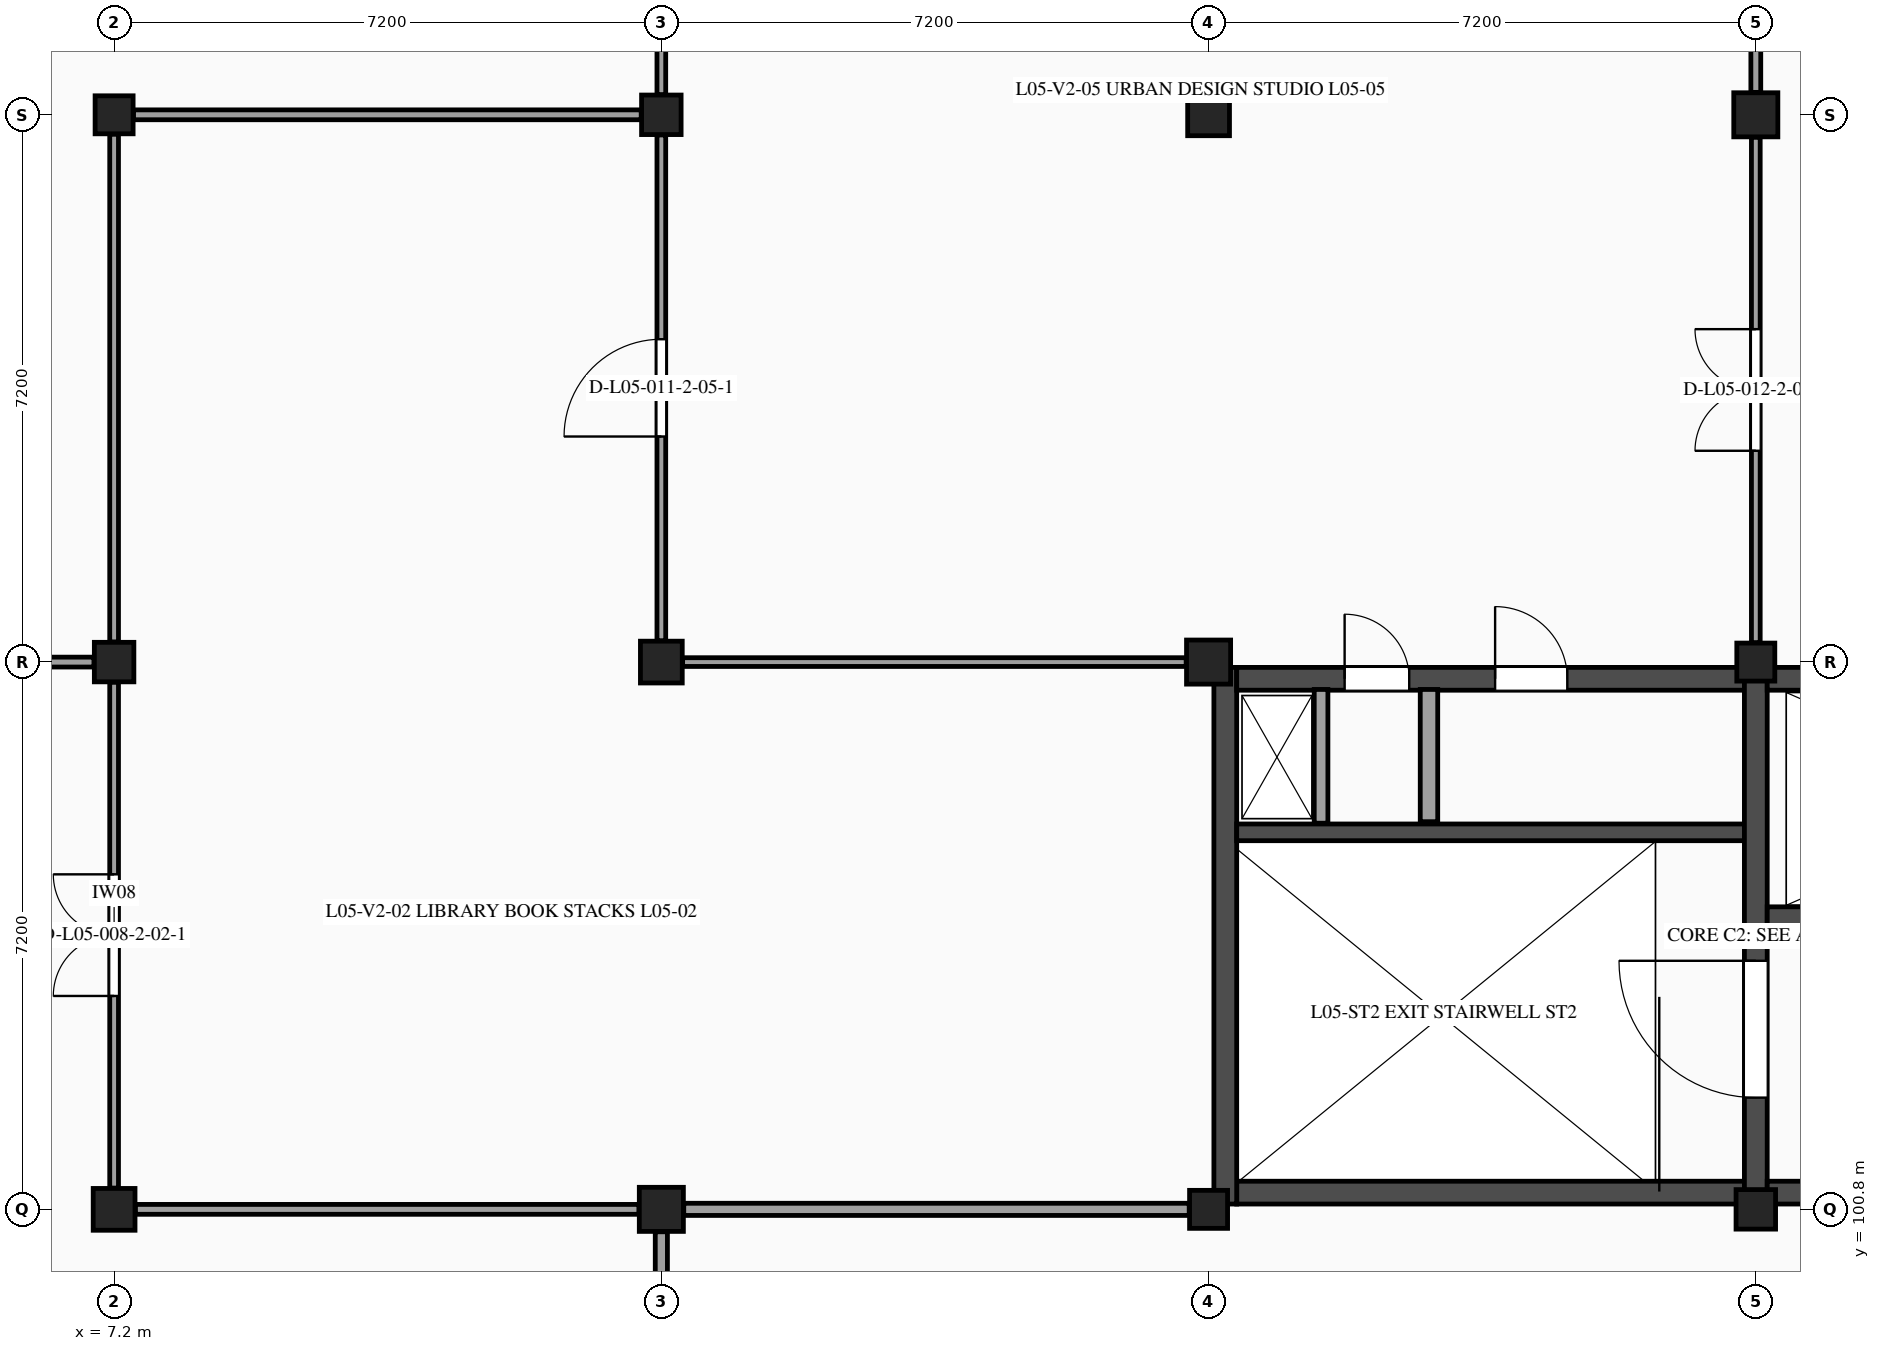
"""IFC4 building model, lengths in metres.
Left out: names, types, materials, properties, quantities, classifications, styles, units other than length and angle.
Written with IfcOpenShell. Run it as: python <this file> out.ifc"""

import sys

from ifc_helpers import new_model, si_unit, direction, frame, frame_2d, origin, origin_2d, place, context, subcontext, project, spatial, rectangle, extrude, element, fill, save


model = new_model("IFC4")
c1 = context("Model", 3, precision=1e-05, world=origin(), true_north=direction((0.0, 1.0)))
c2 = subcontext(c1, "Body", "Model", "MODEL_VIEW")
j1 = project(units=[si_unit("LENGTHUNIT", "METRE"), si_unit("PLANEANGLEUNIT", "RADIAN")], contexts=[c1])
p1 = place(None, origin())
s1 = spatial("IfcSite", under=j1, at=p1, CompositionType="ELEMENT")
p2 = place(p1, origin())
s2 = spatial("IfcBuilding", under=s1, at=p2, CompositionType="ELEMENT")
p3 = place(p2, frame((0.0, 0.0, 22.8)))
s3 = spatial("IfcBuildingStorey", under=s2, at=p3, CompositionType="ELEMENT", Elevation=22.8)
p4 = place(p3, frame((7.2, 100.8, 0.0), z_axis=(0.0, 0.0, 1.0), x_axis=(1.0, 0.0, 0.0)))
e1 = element("IfcColumn", 1, at=p4, inside=s3, PredefinedType="COLUMN", context=c2, shape_type="SweptSolid", body=[
    extrude(rectangle(XDim=0.55, YDim=0.55, at=origin_2d()), origin(), (0.0, 0.0, 1.0), 3.9),
])
p5 = place(p3, frame((7.2, 108.0, 0.0), z_axis=(0.0, 0.0, 1.0), x_axis=(1.0, 0.0, 0.0)))
e2 = element("IfcColumn", 2, at=p5, inside=s3, PredefinedType="COLUMN", context=c2, shape_type="SweptSolid", body=[
    extrude(rectangle(XDim=0.52, YDim=0.52, at=origin_2d()), origin(), (0.0, 0.0, 1.0), 3.9),
])
p6 = place(p3, frame((7.2, 115.2, 0.0), z_axis=(0.0, 0.0, 1.0), x_axis=(1.0, 0.0, 0.0)))
e3 = element("IfcColumn", 3, at=p6, inside=s3, PredefinedType="COLUMN", context=c2, shape_type="SweptSolid", body=[
    extrude(rectangle(XDim=0.5, YDim=0.5, at=origin_2d()), origin(), (0.0, 0.0, 1.0), 3.9),
])
p7 = place(p3, frame((14.4, 100.8, 0.0), z_axis=(0.0, 0.0, 1.0), x_axis=(1.0, 0.0, 0.0)))
e4 = element("IfcColumn", 4, at=p7, inside=s3, PredefinedType="COLUMN", context=c2, shape_type="SweptSolid", body=[
    extrude(rectangle(XDim=0.58, YDim=0.58, at=origin_2d()), origin(), (0.0, 0.0, 1.0), 3.9),
])
p8 = place(p3, frame((14.4, 108.0, 0.0), z_axis=(0.0, 0.0, 1.0), x_axis=(1.0, 0.0, 0.0)))
e5 = element("IfcColumn", 5, at=p8, inside=s3, PredefinedType="COLUMN", context=c2, shape_type="SweptSolid", body=[
    extrude(rectangle(XDim=0.55, YDim=0.55, at=origin_2d()), origin(), (0.0, 0.0, 1.0), 3.9),
])
p9 = place(p3, frame((14.4, 115.2, 0.0), z_axis=(0.0, 0.0, 1.0), x_axis=(1.0, 0.0, 0.0)))
e6 = element("IfcColumn", 6, at=p9, inside=s3, PredefinedType="COLUMN", context=c2, shape_type="SweptSolid", body=[
    extrude(rectangle(XDim=0.52, YDim=0.52, at=origin_2d()), origin(), (0.0, 0.0, 1.0), 3.9),
])
p10 = place(p3, frame((21.6, 100.8, 0.0), z_axis=(0.0, 0.0, 1.0), x_axis=(1.0, 0.0, 0.0)))
e7 = element("IfcColumn", 7, at=p10, inside=s3, PredefinedType="COLUMN", context=c2, shape_type="SweptSolid", body=[
    extrude(rectangle(XDim=0.5, YDim=0.5, at=origin_2d()), origin(), (0.0, 0.0, 1.0), 3.9),
])
p11 = place(p3, frame((21.6, 108.0, 0.0), z_axis=(0.0, 0.0, 1.0), x_axis=(1.0, 0.0, 0.0)))
e8 = element("IfcColumn", 8, at=p11, inside=s3, PredefinedType="COLUMN", context=c2, shape_type="SweptSolid", body=[
    extrude(rectangle(XDim=0.58, YDim=0.58, at=origin_2d()), origin(), (0.0, 0.0, 1.0), 3.9),
])
p12 = place(p3, frame((21.6, 115.2, 0.0), z_axis=(0.0, 0.0, 1.0), x_axis=(1.0, 0.0, 0.0)))
e9 = element("IfcColumn", 9, at=p12, inside=s3, PredefinedType="COLUMN", context=c2, shape_type="SweptSolid", body=[
    extrude(rectangle(XDim=0.55, YDim=0.55, at=origin_2d()), origin(), (0.0, 0.0, 1.0), 3.9),
])
p13 = place(p3, frame((28.8, 100.8, 0.0), z_axis=(0.0, 0.0, 1.0), x_axis=(1.0, 0.0, 0.0)))
e10 = element("IfcColumn", 10, at=p13, inside=s3, PredefinedType="COLUMN", context=c2, shape_type="SweptSolid", body=[
    extrude(rectangle(XDim=0.52, YDim=0.52, at=origin_2d()), origin(), (0.0, 0.0, 1.0), 3.9),
])
p14 = place(p3, frame((28.8, 108.0, 0.0), z_axis=(0.0, 0.0, 1.0), x_axis=(1.0, 0.0, 0.0)))
e11 = element("IfcColumn", 11, at=p14, inside=s3, PredefinedType="COLUMN", context=c2, shape_type="SweptSolid", body=[
    extrude(rectangle(XDim=0.5, YDim=0.5, at=origin_2d()), origin(), (0.0, 0.0, 1.0), 3.9),
])
p15 = place(p3, frame((28.8, 115.2, 0.0), z_axis=(0.0, 0.0, 1.0), x_axis=(1.0, 0.0, 0.0)))
e12 = element("IfcColumn", 12, at=p15, inside=s3, PredefinedType="COLUMN", context=c2, shape_type="SweptSolid", body=[
    extrude(rectangle(XDim=0.58, YDim=0.58, at=origin_2d()), origin(), (0.0, 0.0, 1.0), 3.9),
])
p16 = place(p3, frame((21.97, 101.02, 0.0), z_axis=(0.0, 0.0, 1.0), x_axis=(1.0, 0.0, 0.0)))
e13 = element("IfcWall", 13, at=p16, inside=s3, PredefinedType="SHEAR", context=c2, shape_type="SweptSolid", body=[
    extrude(rectangle(XDim=6.68, YDim=0.3, at=frame_2d((3.34, 0.0))), origin(), (0.0, 0.0, 1.0), 3.67),
])
p17 = place(p3, frame((21.82, 107.93, 0.0), z_axis=(0.0, 0.0, 1.0), x_axis=(0.0, -1.0, 0.0)))
e14 = element("IfcWall", 14, at=p17, inside=s3, PredefinedType="SHEAR", context=c2, shape_type="SweptSolid", body=[
    extrude(rectangle(XDim=7.06, YDim=0.3, at=frame_2d((3.53, 0.0))), origin(), (0.0, 0.0, 1.0), 3.67),
])
p18 = place(p3, frame((21.97, 107.78, 0.0), z_axis=(0.0, 0.0, 1.0), x_axis=(1.0, 0.0, 0.0)))
e15 = element("IfcWall", 15, at=p18, inside=s3, PredefinedType="SHEAR", context=c2, shape_type="SweptSolid", body=[
    extrude(rectangle(XDim=6.68, YDim=0.3, at=frame_2d((3.34, 0.0))), origin(), (0.0, 0.0, 1.0), 3.67),
])
p19 = place(p18, frame((1.42, 0.0, 0.0)))
e16 = element("IfcOpeningElement", 16, at=p19, cuts=e15, PredefinedType="OPENING", context=c2, shape_type="SweptSolid", body=[
    extrude(rectangle(XDim=0.85, YDim=2.1, at=frame_2d((0.425, 1.05))), frame((0.0, 0.16, 0.0), z_axis=(0.0, -1.0, 0.0), x_axis=(1.0, 0.0, 0.0)), (0.0, 0.0, 1.0), 0.32),
])
p20 = place(p18, frame((3.4, 0.0, 0.0)))
e17 = element("IfcOpeningElement", 17, at=p20, cuts=e15, PredefinedType="OPENING", context=c2, shape_type="SweptSolid", body=[
    extrude(rectangle(XDim=0.95, YDim=2.15, at=frame_2d((0.475, 1.075))), frame((0.0, 0.16, 0.0), z_axis=(0.0, -1.0, 0.0), x_axis=(1.0, 0.0, 0.0)), (0.0, 0.0, 1.0), 0.32),
])
p21 = place(p3, frame((21.97, 105.76, 0.0), z_axis=(0.0, 0.0, 1.0), x_axis=(1.0, 0.0, 0.0)))
e18 = element("IfcWall", 18, at=p21, inside=s3, PredefinedType="SHEAR", context=c2, shape_type="SweptSolid", body=[
    extrude(rectangle(XDim=6.68, YDim=0.22, at=frame_2d((3.34, 0.0))), origin(), (0.0, 0.0, 1.0), 3.67),
])
p22 = place(p3, frame((24.5, 105.9, 0.0), z_axis=(0.0, 0.0, 1.0), x_axis=(0.0, 1.0, 0.0)))
e19 = element("IfcWall", 19, at=p22, inside=s3, PredefinedType="PARTITIONING", context=c2, shape_type="SweptSolid", body=[
    extrude(rectangle(XDim=1.74, YDim=0.23, at=frame_2d((0.87, 0.0))), origin(), (0.0, 0.0, 1.0), 3.67),
])
p23 = place(p3, frame((23.08, 105.88, 0.0), z_axis=(0.0, 0.0, 1.0), x_axis=(0.0, 1.0, 0.0)))
e20 = element("IfcWall", 20, at=p23, inside=s3, PredefinedType="PARTITIONING", context=c2, shape_type="SweptSolid", body=[
    extrude(rectangle(XDim=1.76, YDim=0.18, at=frame_2d((0.88, 0.0))), origin(), (0.0, 0.0, 1.0), 3.67),
])
p24 = place(p3, frame((28.8, 100.87, 0.0), z_axis=(0.0, 0.0, 1.0), x_axis=(0.0, 1.0, 0.0)))
e21 = element("IfcWall", 21, at=p24, inside=s3, PredefinedType="SHEAR", context=c2, shape_type="SweptSolid", body=[
    extrude(rectangle(XDim=7.06, YDim=0.3, at=frame_2d((3.53, 0.0))), origin(), (0.0, 0.0, 1.0), 3.67),
])
p25 = place(p24, frame((1.4, 0.0, 0.0)))
e22 = element("IfcOpeningElement", 22, at=p25, cuts=e21, PredefinedType="OPENING", context=c2, shape_type="SweptSolid", body=[
    extrude(rectangle(XDim=1.8, YDim=2.2, at=frame_2d((0.9, 1.1))), frame((0.0, 0.16, 0.0), z_axis=(0.0, -1.0, 0.0), x_axis=(1.0, 0.0, 0.0)), (0.0, 0.0, 1.0), 0.32),
])
p26 = place(p3, frame((28.95, 101.02, 0.0), z_axis=(0.0, 0.0, 1.0), x_axis=(1.0, 0.0, 0.0)))
e23 = element("IfcWall", 23, at=p26, inside=s3, PredefinedType="SHEAR", context=c2, shape_type="SweptSolid", body=[
    extrude(rectangle(XDim=6.68, YDim=0.3, at=frame_2d((3.34, 0.0))), origin(), (0.0, 0.0, 1.0), 3.67),
])
p27 = place(p26, frame((2.22, 0.0, 0.0)))
e24 = element("IfcOpeningElement", 24, at=p27, cuts=e23, PredefinedType="OPENING", context=c2, shape_type="SweptSolid", body=[
    extrude(rectangle(XDim=1.8, YDim=2.2, at=frame_2d((0.9, 1.1))), frame((0.0, 0.16, 0.0), z_axis=(0.0, -1.0, 0.0), x_axis=(1.0, 0.0, 0.0)), (0.0, 0.0, 1.0), 0.32),
])
p28 = place(p3, frame((28.95, 107.78, 0.0), z_axis=(0.0, 0.0, 1.0), x_axis=(1.0, 0.0, 0.0)))
e25 = element("IfcWall", 25, at=p28, inside=s3, PredefinedType="SHEAR", context=c2, shape_type="SweptSolid", body=[
    extrude(rectangle(XDim=6.68, YDim=0.3, at=frame_2d((3.34, 0.0))), origin(), (0.0, 0.0, 1.0), 3.67),
])
p29 = place(p3, frame((28.95, 104.65, 0.0), z_axis=(0.0, 0.0, 1.0), x_axis=(1.0, 0.0, 0.0)))
e26 = element("IfcWall", 26, at=p29, inside=s3, PredefinedType="SHEAR", context=c2, shape_type="SweptSolid", body=[
    extrude(rectangle(XDim=6.68, YDim=0.26, at=frame_2d((3.34, 0.0))), origin(), (0.0, 0.0, 1.0), 3.67),
])
p30 = place(p29, frame((0.95, 0.0, 0.0)))
e27 = element("IfcOpeningElement", 27, at=p30, cuts=e26, PredefinedType="OPENING", context=c2, shape_type="SweptSolid", body=[
    extrude(rectangle(XDim=1.1, YDim=2.2, at=frame_2d((0.55, 1.1))), frame((0.0, 0.14, 0.0), z_axis=(0.0, -1.0, 0.0), x_axis=(1.0, 0.0, 0.0)), (0.0, 0.0, 1.0), 0.28),
])
p31 = place(p29, frame((4.1, 0.0, 0.0)))
e28 = element("IfcOpeningElement", 28, at=p31, cuts=e26, PredefinedType="OPENING", context=c2, shape_type="SweptSolid", body=[
    extrude(rectangle(XDim=1.0, YDim=2.15, at=frame_2d((0.5, 1.075))), frame((0.0, 0.14, 0.0), z_axis=(0.0, -1.0, 0.0), x_axis=(1.0, 0.0, 0.0)), (0.0, 0.0, 1.0), 0.28),
])
p32 = place(p3, frame((7.2, 101.08, 0.0), z_axis=(0.0, 0.0, 1.0), x_axis=(0.0, 1.0, 0.0)))
e29 = element("IfcWall", 29, at=p32, inside=s3, PredefinedType="PARTITIONING", context=c2, shape_type="SweptSolid", body=[
    extrude(rectangle(XDim=6.655, YDim=0.115, at=frame_2d((3.328, 0.0))), origin(), (0.0, 0.0, 1.0), 3.205),
])
p33 = place(p32, frame((2.528, 0.0, 0.0)))
e30 = element("IfcOpeningElement", 30, at=p33, cuts=e29, PredefinedType="OPENING", context=c2, shape_type="SweptSolid", body=[
    extrude(rectangle(XDim=1.6, YDim=2.2, at=frame_2d((0.8, 1.1))), frame((0.0, 0.067, 0.0), z_axis=(0.0, -1.0, 0.0), x_axis=(1.0, 0.0, 0.0)), (0.0, 0.0, 1.0), 0.135),
])
p34 = place(p3, frame((0.255, 108.0, 0.0), z_axis=(0.0, 0.0, 1.0), x_axis=(1.0, 0.0, 0.0)))
e31 = element("IfcWall", 31, at=p34, inside=s3, PredefinedType="PARTITIONING", context=c2, shape_type="SweptSolid", body=[
    extrude(rectangle(XDim=6.68, YDim=0.13, at=frame_2d((3.34, 0.0))), origin(), (0.0, 0.0, 1.0), 3.2),
])
p35 = place(p34, frame((2.6, 0.0, 0.0)))
e32 = element("IfcOpeningElement", 32, at=p35, cuts=e31, PredefinedType="OPENING", context=c2, shape_type="SweptSolid", body=[
    extrude(rectangle(XDim=1.48, YDim=2.28, at=frame_2d((0.74, 1.14))), frame((0.0, 0.075, 0.0), z_axis=(0.0, -1.0, 0.0), x_axis=(1.0, 0.0, 0.0)), (0.0, 0.0, 1.0), 0.15),
])
p36 = place(p3, frame((7.2, 108.265, 0.0), z_axis=(0.0, 0.0, 1.0), x_axis=(0.0, 1.0, 0.0)))
e33 = element("IfcWall", 33, at=p36, inside=s3, PredefinedType="PARTITIONING", context=c2, shape_type="SweptSolid", body=[
    extrude(rectangle(XDim=6.68, YDim=0.115, at=frame_2d((3.34, 0.0))), origin(), (0.0, 0.0, 1.0), 3.27),
])
p37 = place(p3, frame((14.4, 93.855, 0.0), z_axis=(0.0, 0.0, 1.0), x_axis=(0.0, 1.0, 0.0)))
e34 = element("IfcWall", 34, at=p37, inside=s3, PredefinedType="PARTITIONING", context=c2, shape_type="SweptSolid", body=[
    extrude(rectangle(XDim=6.65, YDim=0.16, at=frame_2d((3.325, 0.0))), origin(), (0.0, 0.0, 1.0), 3.205),
])
p38 = place(p37, frame((2.525, 0.0, 0.0)))
e35 = element("IfcOpeningElement", 35, at=p38, cuts=e34, PredefinedType="OPENING", context=c2, shape_type="SweptSolid", body=[
    extrude(rectangle(XDim=1.6, YDim=2.2, at=frame_2d((0.8, 1.1))), frame((0.0, 0.09, 0.0), z_axis=(0.0, -1.0, 0.0), x_axis=(1.0, 0.0, 0.0)), (0.0, 0.0, 1.0), 0.18),
])
p39 = place(p3, frame((7.48, 100.8, 0.0), z_axis=(0.0, 0.0, 1.0), x_axis=(1.0, 0.0, 0.0)))
e36 = element("IfcWall", 36, at=p39, inside=s3, PredefinedType="PARTITIONING", context=c2, shape_type="SweptSolid", body=[
    extrude(rectangle(XDim=6.625, YDim=0.13, at=frame_2d((3.312, 0.0))), origin(), (0.0, 0.0, 1.0), 3.24),
])
p40 = place(p3, frame((14.4, 108.28, 0.0), z_axis=(0.0, 0.0, 1.0), x_axis=(0.0, 1.0, 0.0)))
e37 = element("IfcWall", 37, at=p40, inside=s3, PredefinedType="PARTITIONING", context=c2, shape_type="SweptSolid", body=[
    extrude(rectangle(XDim=6.655, YDim=0.115, at=frame_2d((3.328, 0.0))), origin(), (0.0, 0.0, 1.0), 3.27),
])
p41 = place(p40, frame((2.688, 0.0, 0.0)))
e38 = element("IfcOpeningElement", 38, at=p41, cuts=e37, PredefinedType="OPENING", context=c2, shape_type="SweptSolid", body=[
    extrude(rectangle(XDim=1.28, YDim=2.24, at=frame_2d((0.64, 1.12))), frame((0.0, 0.067, 0.0), z_axis=(0.0, -1.0, 0.0), x_axis=(1.0, 0.0, 0.0)), (0.0, 0.0, 1.0), 0.135),
])
p42 = place(p3, frame((7.455, 115.2, 0.0), z_axis=(0.0, 0.0, 1.0), x_axis=(1.0, 0.0, 0.0)))
e39 = element("IfcWall", 39, at=p42, inside=s3, PredefinedType="PARTITIONING", context=c2, shape_type="SweptSolid", body=[
    extrude(rectangle(XDim=6.68, YDim=0.13, at=frame_2d((3.34, 0.0))), origin(), (0.0, 0.0, 1.0), 3.24),
])
p43 = place(p3, frame((14.4, 115.465, 0.0), z_axis=(0.0, 0.0, 1.0), x_axis=(0.0, 1.0, 0.0)))
e40 = element("IfcWall", 40, at=p43, inside=s3, PredefinedType="PARTITIONING", context=c2, shape_type="SweptSolid", body=[
    extrude(rectangle(XDim=6.68, YDim=0.115, at=frame_2d((3.34, 0.0))), origin(), (0.0, 0.0, 1.0), 3.265),
])
p44 = place(p3, frame((14.695, 100.8, 0.0), z_axis=(0.0, 0.0, 1.0), x_axis=(1.0, 0.0, 0.0)))
e41 = element("IfcWall", 41, at=p44, inside=s3, PredefinedType="PARTITIONING", context=c2, shape_type="SweptSolid", body=[
    extrude(rectangle(XDim=6.65, YDim=0.16, at=frame_2d((3.325, 0.0))), origin(), (0.0, 0.0, 1.0), 3.25),
])
p45 = place(p3, frame((14.68, 108.0, 0.0), z_axis=(0.0, 0.0, 1.0), x_axis=(1.0, 0.0, 0.0)))
e42 = element("IfcWall", 42, at=p45, inside=s3, PredefinedType="PARTITIONING", context=c2, shape_type="SweptSolid", body=[
    extrude(rectangle(XDim=6.625, YDim=0.115, at=frame_2d((3.312, 0.0))), origin(), (0.0, 0.0, 1.0), 3.25),
])
p46 = place(p3, frame((28.8, 108.255, 0.0), z_axis=(0.0, 0.0, 1.0), x_axis=(0.0, 1.0, 0.0)))
e43 = element("IfcWall", 43, at=p46, inside=s3, PredefinedType="PARTITIONING", context=c2, shape_type="SweptSolid", body=[
    extrude(rectangle(XDim=6.65, YDim=0.115, at=frame_2d((3.325, 0.0))), origin(), (0.0, 0.0, 1.0), 3.27),
])
p47 = place(p46, frame((2.525, 0.0, 0.0)))
e44 = element("IfcOpeningElement", 44, at=p47, cuts=e43, PredefinedType="OPENING", context=c2, shape_type="SweptSolid", body=[
    extrude(rectangle(XDim=1.6, YDim=2.2, at=frame_2d((0.8, 1.1))), frame((0.0, 0.067, 0.0), z_axis=(0.0, -1.0, 0.0), x_axis=(1.0, 0.0, 0.0)), (0.0, 0.0, 1.0), 0.135),
])
p48 = place(p3, frame((28.8, 115.495, 0.0), z_axis=(0.0, 0.0, 1.0), x_axis=(0.0, 1.0, 0.0)))
e45 = element("IfcWall", 45, at=p48, inside=s3, PredefinedType="PARTITIONING", context=c2, shape_type="SweptSolid", body=[
    extrude(rectangle(XDim=6.625, YDim=0.13, at=frame_2d((3.312, 0.0))), origin(), (0.0, 0.0, 1.0), 3.265),
])
p49 = place(p19, origin())
e46 = element("IfcDoor", 46, at=p49, inside=s3, OperationType="SINGLE_SWING_LEFT", PredefinedType="DOOR", context=c2, shape_type="SweptSolid", body=[
    extrude(rectangle(XDim=0.85, YDim=2.1, at=frame_2d((0.425, 1.05))), frame((0.0, 0.025, 0.0), z_axis=(0.0, -1.0, 0.0), x_axis=(1.0, 0.0, 0.0)), (0.0, 0.0, 1.0), 0.05),
])
fill(e16, e46)
p50 = place(p25, origin())
e47 = element("IfcDoor", 47, at=p50, inside=s3, OperationType="SINGLE_SWING_RIGHT", PredefinedType="DOOR", context=c2, shape_type="SweptSolid", body=[
    extrude(rectangle(XDim=1.8, YDim=2.2, at=frame_2d((0.9, 1.1))), frame((0.0, 0.025, 0.0), z_axis=(0.0, -1.0, 0.0), x_axis=(1.0, 0.0, 0.0)), (0.0, 0.0, 1.0), 0.05),
])
fill(e22, e47)
p51 = place(p20, origin())
e48 = element("IfcDoor", 48, at=p51, inside=s3, OperationType="SINGLE_SWING_LEFT", PredefinedType="DOOR", context=c2, shape_type="SweptSolid", body=[
    extrude(rectangle(XDim=0.95, YDim=2.15, at=frame_2d((0.475, 1.075))), frame((0.0, 0.025, 0.0), z_axis=(0.0, -1.0, 0.0), x_axis=(1.0, 0.0, 0.0)), (0.0, 0.0, 1.0), 0.05),
])
fill(e17, e48)
p52 = place(p33, origin())
e49 = element("IfcDoor", 49, at=p52, inside=s3, OperationType="DOUBLE_DOOR_SINGLE_SWING", PredefinedType="DOOR", context=c2, shape_type="SweptSolid", body=[
    extrude(rectangle(XDim=1.6, YDim=2.2, at=frame_2d((0.8, 1.1))), frame((0.0, 0.025, 0.0), z_axis=(0.0, -1.0, 0.0), x_axis=(1.0, 0.0, 0.0)), (0.0, 0.0, 1.0), 0.05),
])
fill(e30, e49)
p53 = place(p41, origin())
e50 = element("IfcDoor", 50, at=p53, inside=s3, OperationType="SINGLE_SWING_LEFT", PredefinedType="DOOR", context=c2, shape_type="SweptSolid", body=[
    extrude(rectangle(XDim=1.28, YDim=2.24, at=frame_2d((0.64, 1.12))), frame((0.0, 0.025, 0.0), z_axis=(0.0, -1.0, 0.0), x_axis=(1.0, 0.0, 0.0)), (0.0, 0.0, 1.0), 0.05),
])
fill(e38, e50)
p54 = place(p47, origin())
e51 = element("IfcDoor", 51, at=p54, inside=s3, OperationType="DOUBLE_DOOR_SINGLE_SWING", PredefinedType="DOOR", context=c2, shape_type="SweptSolid", body=[
    extrude(rectangle(XDim=1.6, YDim=2.2, at=frame_2d((0.8, 1.1))), frame((0.0, 0.025, 0.0), z_axis=(0.0, -1.0, 0.0), x_axis=(1.0, 0.0, 0.0)), (0.0, 0.0, 1.0), 0.05),
])
fill(e44, e51)
save(model, sys.argv[1])
